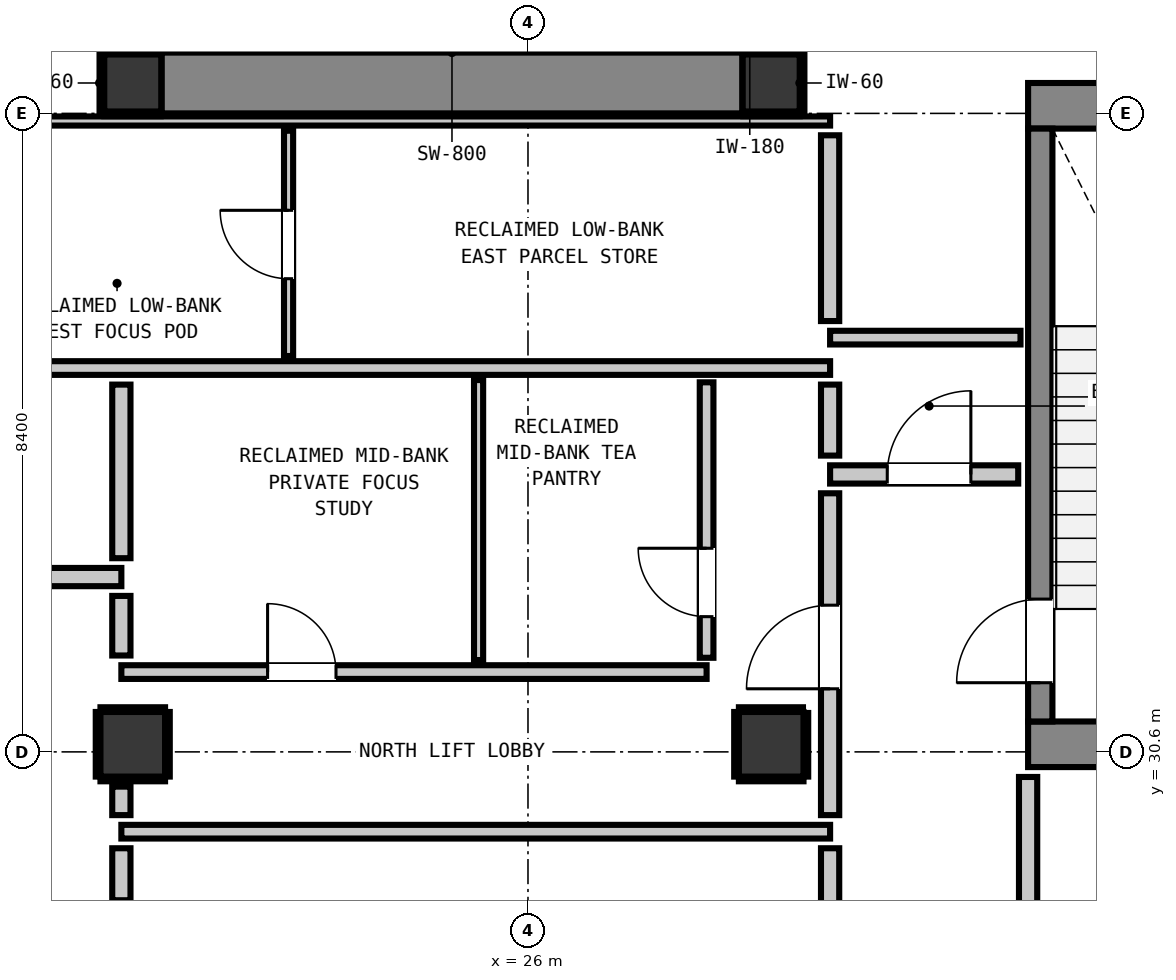
"""IFC4 building model, lengths in metres.
Left out: names, types, materials, properties, quantities, classifications, styles, units other than length and angle.
Written with IfcOpenShell. Run it as: python <this file> out.ifc"""

import sys

from ifc_helpers import new_model, si_unit, direction, frame, frame_2d, origin, origin_2d, place, context, subcontext, project, spatial, rectangle, extrude, element, fill, save


model = new_model("IFC4")
c1 = context("Model", 3, precision=1e-05, world=origin(), true_north=direction((0.0, 1.0)))
c2 = subcontext(c1, "Body", "Model", "MODEL_VIEW")
j1 = project(units=[si_unit("LENGTHUNIT", "METRE"), si_unit("PLANEANGLEUNIT", "RADIAN")], contexts=[c1])
p1 = place(None, origin())
s1 = spatial("IfcSite", under=j1, at=p1, CompositionType="ELEMENT")
p2 = place(p1, origin())
s2 = spatial("IfcBuilding", under=s1, at=p2, CompositionType="ELEMENT")
p3 = place(p2, frame((0.0, 0.0, 273.48)))
s3 = spatial("IfcBuildingStorey", under=s2, at=p3, CompositionType="ELEMENT", Elevation=273.48)
for number, where, z_axis, x_axis in (
    (1, (20.8, 39.4, 0.0), (0.0, 0.0, 1.0), (1.0, 0.0, 0.0)),
    (2, (29.2, 39.4, 0.0), (0.0, 0.0, 1.0), (1.0, 0.0, 0.0)),
):
    element("IfcColumn", number, at=place(p3, frame(where, z_axis=z_axis, x_axis=x_axis)), inside=s3, PredefinedType="COLUMN", context=c2, shape_type="SweptSolid", body=[
        extrude(rectangle(XDim=0.75, YDim=0.75, at=origin_2d()), origin(), (0.0, 0.0, 1.0), 4.18),
    ])
p4 = place(p3, frame((32.58, 39.1, 0.0), z_axis=(0.0, 0.0, 1.0), x_axis=(1.0, 0.0, 0.0)))
e3 = element("IfcWall", 3, at=p4, inside=s3, PredefinedType="SHEAR", context=c2, shape_type="SweptSolid", body=[
    extrude(rectangle(XDim=4.08, YDim=0.6, at=frame_2d((2.04, 0.0))), origin(), (0.0, 0.0, 1.0), 4.6),
])
p5 = place(p3, frame((32.58, 30.7, 0.0), z_axis=(0.0, 0.0, 1.0), x_axis=(1.0, 0.0, 0.0)))
e4 = element("IfcWall", 4, at=p5, inside=s3, PredefinedType="SHEAR", context=c2, shape_type="SweptSolid", body=[
    extrude(rectangle(XDim=3.54, YDim=0.6, at=frame_2d((1.77, 0.0))), origin(), (0.0, 0.0, 1.0), 4.6),
])
p6 = place(p3, frame((21.18, 39.4, 0.0), z_axis=(0.0, 0.0, 1.0), x_axis=(1.0, 0.0, 0.0)))
e5 = element("IfcWall", 5, at=p6, inside=s3, PredefinedType="SHEAR", context=c2, shape_type="SweptSolid", body=[
    extrude(rectangle(XDim=7.64, YDim=0.8, at=frame_2d((3.82, 0.0))), origin(), (0.0, 0.0, 1.0), 4.6),
])
p7 = place(p3, frame((32.74, 31.0, 0.0), z_axis=(0.0, 0.0, 1.0), x_axis=(0.0, 1.0, 0.0)))
e6 = element("IfcWall", 6, at=p7, inside=s3, PredefinedType="SHEAR", context=c2, shape_type="SweptSolid", body=[
    extrude(rectangle(XDim=7.8, YDim=0.32, at=frame_2d((3.9, 0.0))), origin(), (0.0, 0.0, 1.0), 4.6),
])
p8 = place(p7, frame((0.51, 0.0, 0.0)))
e7 = element("IfcOpeningElement", 7, at=p8, cuts=e6, PredefinedType="OPENING", context=c2, shape_type="SweptSolid", body=[
    extrude(rectangle(XDim=1.1, YDim=2.15, at=frame_2d((0.55, 1.075))), frame((0.0, 0.17, 0.0), z_axis=(0.0, -1.0, 0.0), x_axis=(1.0, 0.0, 0.0)), (0.0, 0.0, 1.0), 0.34),
])
for number, where, z_axis, x_axis in (
    (8, (20.8, 30.7, 0.0), (0.0, 0.0, 1.0), (1.0, 0.0, 0.0)),
    (9, (29.2, 30.7, 0.0), (0.0, 0.0, 1.0), (1.0, 0.0, 0.0)),
):
    element("IfcColumn", number, at=place(p3, frame(where, z_axis=z_axis, x_axis=x_axis)), inside=s3, PredefinedType="COLUMN", context=c2, shape_type="SweptSolid", body=[
        extrude(rectangle(XDim=0.85, YDim=0.85, at=origin_2d()), origin(), (0.0, 0.0, 1.0), 4.6),
    ])
p9 = place(p3, frame((17.45, 32.9, 0.0), z_axis=(0.0, 0.0, 1.0), x_axis=(1.0, 0.0, 0.0)))
e10 = element("IfcWall", 10, at=p9, inside=s3, PredefinedType="PARTITIONING", context=c2, shape_type="SweptSolid", body=[
    extrude(rectangle(XDim=3.2, YDim=0.24, at=frame_2d((1.6, 0.0))), origin(), (0.0, 0.0, 1.0), 4.18),
])
p10 = place(p9, frame((0.159, 0.0, 0.0)))
e11 = element("IfcOpeningElement", 11, at=p10, cuts=e10, PredefinedType="OPENING", context=c2, shape_type="SweptSolid", body=[
    extrude(rectangle(XDim=1.1, YDim=2.15, at=frame_2d((0.55, 1.075))), frame((0.0, 0.13, 0.0), z_axis=(0.0, -1.0, 0.0), x_axis=(1.0, 0.0, 0.0)), (0.0, 0.0, 1.0), 0.26),
])
p11 = place(p3, frame((29.975, 34.25, 0.0), z_axis=(0.0, 0.0, 1.0), x_axis=(1.0, 0.0, 0.0)))
e12 = element("IfcWall", 12, at=p11, inside=s3, PredefinedType="PARTITIONING", context=c2, shape_type="SweptSolid", body=[
    extrude(rectangle(XDim=2.475, YDim=0.24, at=frame_2d((1.237, 0.0))), origin(), (0.0, 0.0, 1.0), 4.18),
])
p12 = place(p11, frame((0.752, 0.0, 0.0)))
e13 = element("IfcOpeningElement", 13, at=p12, cuts=e12, PredefinedType="OPENING", context=c2, shape_type="SweptSolid", body=[
    extrude(rectangle(XDim=1.1, YDim=2.15, at=frame_2d((0.55, 1.075))), frame((0.0, 0.13, 0.0), z_axis=(0.0, -1.0, 0.0), x_axis=(1.0, 0.0, 0.0)), (0.0, 0.0, 1.0), 0.26),
])
p13 = place(p3, frame((20.65, 29.55, 0.0), z_axis=(0.0, 0.0, 1.0), x_axis=(1.0, 0.0, 0.0)))
e14 = element("IfcWall", 14, at=p13, inside=s3, PredefinedType="PARTITIONING", context=c2, shape_type="SweptSolid", body=[
    extrude(rectangle(XDim=9.325, YDim=0.18, at=frame_2d((4.663, 0.0))), origin(), (0.0, 0.0, 1.0), 4.18),
])
p14 = place(p3, frame((20.65, 31.65, 0.0), z_axis=(0.0, 0.0, 1.0), x_axis=(1.0, 0.0, 0.0)))
e15 = element("IfcWall", 15, at=p14, inside=s3, PredefinedType="PARTITIONING", context=c2, shape_type="SweptSolid", body=[
    extrude(rectangle(XDim=7.7, YDim=0.18, at=frame_2d((3.85, 0.0))), origin(), (0.0, 0.0, 1.0), 4.18),
])
p15 = place(p14, frame((1.924, 0.0, 0.0)))
e16 = element("IfcOpeningElement", 16, at=p15, cuts=e15, PredefinedType="OPENING", context=c2, shape_type="SweptSolid", body=[
    extrude(rectangle(XDim=0.9, YDim=2.1, at=frame_2d((0.45, 1.05))), frame((0.0, 0.1, 0.0), z_axis=(0.0, -1.0, 0.0), x_axis=(1.0, 0.0, 0.0)), (0.0, 0.0, 1.0), 0.2),
])
p16 = place(p3, frame((18.95, 35.65, 0.0), z_axis=(0.0, 0.0, 1.0), x_axis=(1.0, 0.0, 0.0)))
e17 = element("IfcWall", 17, at=p16, inside=s3, PredefinedType="PARTITIONING", context=c2, shape_type="SweptSolid", body=[
    extrude(rectangle(XDim=11.025, YDim=0.18, at=frame_2d((5.513, 0.0))), origin(), (0.0, 0.0, 1.0), 4.18),
])
p17 = place(p3, frame((29.975, 36.05, 0.0), z_axis=(0.0, 0.0, 1.0), x_axis=(1.0, 0.0, 0.0)))
e18 = element("IfcWall", 18, at=p17, inside=s3, PredefinedType="PARTITIONING", context=c2, shape_type="SweptSolid", body=[
    extrude(rectangle(XDim=2.505, YDim=0.18, at=frame_2d((1.252, 0.0))), origin(), (0.0, 0.0, 1.0), 4.18),
])
p18 = place(p3, frame((18.95, 38.9, 0.0), z_axis=(0.0, 0.0, 1.0), x_axis=(1.0, 0.0, 0.0)))
e19 = element("IfcWall", 19, at=p18, inside=s3, PredefinedType="PARTITIONING", context=c2, shape_type="SweptSolid", body=[
    extrude(rectangle(XDim=11.025, YDim=0.12, at=frame_2d((5.513, 0.0))), origin(), (0.0, 0.0, 1.0), 1.965),
])
p19 = place(p3, frame((20.65, 28.648, 0.0), z_axis=(0.0, 0.0, 1.0), x_axis=(0.0, 1.0, 0.0)))
e20 = element("IfcWall", 20, at=p19, inside=s3, PredefinedType="PARTITIONING", context=c2, shape_type="SweptSolid", body=[
    extrude(rectangle(XDim=0.684, YDim=0.24, at=frame_2d((0.342, 0.0))), origin(), (0.0, 0.0, 1.0), 1.965),
])
p20 = place(p3, frame((20.65, 29.768, 0.0), z_axis=(0.0, 0.0, 1.0), x_axis=(0.0, 1.0, 0.0)))
e21 = element("IfcWall", 21, at=p20, inside=s3, PredefinedType="PARTITIONING", context=c2, shape_type="SweptSolid", body=[
    extrude(rectangle(XDim=0.375, YDim=0.24, at=frame_2d((0.188, 0.0))), origin(), (0.0, 0.0, 1.0), 1.965),
])
p21 = place(p3, frame((20.65, 31.868, 0.0), z_axis=(0.0, 0.0, 1.0), x_axis=(0.0, 1.0, 0.0)))
e22 = element("IfcWall", 22, at=p21, inside=s3, PredefinedType="PARTITIONING", context=c2, shape_type="SweptSolid", body=[
    extrude(rectangle(XDim=0.784, YDim=0.24, at=frame_2d((0.392, 0.0))), origin(), (0.0, 0.0, 1.0), 1.965),
])
p22 = place(p3, frame((20.65, 33.148, 0.0), z_axis=(0.0, 0.0, 1.0), x_axis=(0.0, 1.0, 0.0)))
e23 = element("IfcWall", 23, at=p22, inside=s3, PredefinedType="PARTITIONING", context=c2, shape_type="SweptSolid", body=[
    extrude(rectangle(XDim=2.284, YDim=0.24, at=frame_2d((1.142, 0.0))), origin(), (0.0, 0.0, 1.0), 1.965),
])
p23 = place(p3, frame((29.975, 25.648, 0.0), z_axis=(0.0, 0.0, 1.0), x_axis=(0.0, 1.0, 0.0)))
e24 = element("IfcWall", 24, at=p23, inside=s3, PredefinedType="PARTITIONING", context=c2, shape_type="SweptSolid", body=[
    extrude(rectangle(XDim=3.684, YDim=0.24, at=frame_2d((1.842, 0.0))), origin(), (0.0, 0.0, 1.0), 4.18),
])
p24 = place(p3, frame((29.975, 29.768, 0.0), z_axis=(0.0, 0.0, 1.0), x_axis=(0.0, 1.0, 0.0)))
e25 = element("IfcWall", 25, at=p24, inside=s3, PredefinedType="PARTITIONING", context=c2, shape_type="SweptSolid", body=[
    extrude(rectangle(XDim=4.234, YDim=0.24, at=frame_2d((2.117, 0.0))), origin(), (0.0, 0.0, 1.0), 4.18),
])
p25 = place(p24, frame((1.662, 0.0, 0.0)))
e26 = element("IfcOpeningElement", 26, at=p25, cuts=e25, PredefinedType="OPENING", context=c2, shape_type="SweptSolid", body=[
    extrude(rectangle(XDim=1.1, YDim=2.15, at=frame_2d((0.55, 1.075))), frame((0.0, 0.13, 0.0), z_axis=(0.0, -1.0, 0.0), x_axis=(1.0, 0.0, 0.0)), (0.0, 0.0, 1.0), 0.26),
])
p26 = place(p3, frame((29.975, 34.498, 0.0), z_axis=(0.0, 0.0, 1.0), x_axis=(0.0, 1.0, 0.0)))
e27 = element("IfcWall", 27, at=p26, inside=s3, PredefinedType="PARTITIONING", context=c2, shape_type="SweptSolid", body=[
    extrude(rectangle(XDim=0.934, YDim=0.24, at=frame_2d((0.467, 0.0))), origin(), (0.0, 0.0, 1.0), 4.18),
])
p27 = place(p3, frame((29.975, 36.268, 0.0), z_axis=(0.0, 0.0, 1.0), x_axis=(0.0, 1.0, 0.0)))
e28 = element("IfcWall", 28, at=p27, inside=s3, PredefinedType="PARTITIONING", context=c2, shape_type="SweptSolid", body=[
    extrude(rectangle(XDim=2.444, YDim=0.24, at=frame_2d((1.222, 0.0))), origin(), (0.0, 0.0, 1.0), 4.18),
])
p28 = place(p3, frame((32.58, 25.648, 0.0), z_axis=(0.0, 0.0, 1.0), x_axis=(0.0, 1.0, 0.0)))
e29 = element("IfcWall", 29, at=p28, inside=s3, PredefinedType="PARTITIONING", context=c2, shape_type="SweptSolid", body=[
    extrude(rectangle(XDim=4.622, YDim=0.24, at=frame_2d((2.311, 0.0))), origin(), (0.0, 0.0, 1.0), 4.18),
])
p29 = place(p3, frame((28.35, 31.838, 0.0), z_axis=(0.0, 0.0, 1.0), x_axis=(0.0, 1.0, 0.0)))
e30 = element("IfcWall", 30, at=p29, inside=s3, PredefinedType="PARTITIONING", context=c2, shape_type="SweptSolid", body=[
    extrude(rectangle(XDim=3.624, YDim=0.18, at=frame_2d((1.812, 0.0))), origin(), (0.0, 0.0, 1.0), 4.18),
])
p30 = place(p29, frame((0.541, 0.0, 0.0)))
e31 = element("IfcOpeningElement", 31, at=p30, cuts=e30, PredefinedType="OPENING", context=c2, shape_type="SweptSolid", body=[
    extrude(rectangle(XDim=0.9, YDim=2.1, at=frame_2d((0.45, 1.05))), frame((0.0, 0.1, 0.0), z_axis=(0.0, -1.0, 0.0), x_axis=(1.0, 0.0, 0.0)), (0.0, 0.0, 1.0), 0.2),
])
p31 = place(p3, frame((22.85, 35.808, 0.0), z_axis=(0.0, 0.0, 1.0), x_axis=(0.0, 1.0, 0.0)))
e32 = element("IfcWall", 32, at=p31, inside=s3, PredefinedType="PARTITIONING", context=c2, shape_type="SweptSolid", body=[
    extrude(rectangle(XDim=2.964, YDim=0.12, at=frame_2d((1.482, 0.0))), origin(), (0.0, 0.0, 1.0), 4.18),
])
p32 = place(p31, frame((1.017, 0.0, 0.0)))
e33 = element("IfcOpeningElement", 33, at=p32, cuts=e32, PredefinedType="OPENING", context=c2, shape_type="SweptSolid", body=[
    extrude(rectangle(XDim=0.9, YDim=2.1, at=frame_2d((0.45, 1.05))), frame((0.0, 0.07, 0.0), z_axis=(0.0, -1.0, 0.0), x_axis=(1.0, 0.0, 0.0)), (0.0, 0.0, 1.0), 0.14),
])
p33 = place(p3, frame((25.35, 31.808, 0.0), z_axis=(0.0, 0.0, 1.0), x_axis=(0.0, 1.0, 0.0)))
e34 = element("IfcWall", 34, at=p33, inside=s3, PredefinedType="PARTITIONING", context=c2, shape_type="SweptSolid", body=[
    extrude(rectangle(XDim=3.684, YDim=0.12, at=frame_2d((1.842, 0.0))), origin(), (0.0, 0.0, 1.0), 4.18),
])
for number, where, z_axis, x_axis in (
    (35, (20.425, 38.993, 0.0), (0.0, 0.0, 1.0), (1.0, 0.0, 0.0)),
    (36, (20.425, 39.807, 0.0), (0.0, 0.0, 1.0), (1.0, 0.0, 0.0)),
):
    element("IfcWall", number, at=place(p3, frame(where, z_axis=z_axis, x_axis=x_axis)), inside=s3, PredefinedType="PARTITIONING", context=c2, shape_type="SweptSolid", body=[
        extrude(rectangle(XDim=0.742, YDim=0.06, at=frame_2d((0.371, 0.0))), origin(), (0.0, 0.0, 1.0), 1.45),
    ])
p34 = place(p3, frame((20.393, 39.025, 0.0), z_axis=(0.0, 0.0, 1.0), x_axis=(0.0, 1.0, 0.0)))
e37 = element("IfcWall", 37, at=p34, inside=s3, PredefinedType="PARTITIONING", context=c2, shape_type="SweptSolid", body=[
    extrude(rectangle(XDim=0.75, YDim=0.06, at=frame_2d((0.375, 0.0))), origin(), (0.0, 0.0, 1.0), 1.45),
])
for number, where, z_axis, x_axis in (
    (38, (28.833, 38.993, 0.0), (0.0, 0.0, 1.0), (1.0, 0.0, 0.0)),
    (39, (28.833, 39.807, 0.0), (0.0, 0.0, 1.0), (1.0, 0.0, 0.0)),
):
    element("IfcWall", number, at=place(p3, frame(where, z_axis=z_axis, x_axis=x_axis)), inside=s3, PredefinedType="PARTITIONING", context=c2, shape_type="SweptSolid", body=[
        extrude(rectangle(XDim=0.742, YDim=0.06, at=frame_2d((0.371, 0.0))), origin(), (0.0, 0.0, 1.0), 1.45),
    ])
p35 = place(p3, frame((29.607, 39.025, 0.0), z_axis=(0.0, 0.0, 1.0), x_axis=(0.0, 1.0, 0.0)))
e40 = element("IfcWall", 40, at=p35, inside=s3, PredefinedType="PARTITIONING", context=c2, shape_type="SweptSolid", body=[
    extrude(rectangle(XDim=0.75, YDim=0.06, at=frame_2d((0.375, 0.0))), origin(), (0.0, 0.0, 1.0), 1.45),
])
for number, where, z_axis, x_axis in (
    (41, (20.375, 30.243, 0.0), (0.0, 0.0, 1.0), (1.0, 0.0, 0.0)),
    (42, (20.375, 31.157, 0.0), (0.0, 0.0, 1.0), (1.0, 0.0, 0.0)),
    (43, (20.343, 30.275, 0.0), (0.0, 0.0, 1.0), (0.0, 1.0, 0.0)),
    (44, (21.257, 30.275, 0.0), (0.0, 0.0, 1.0), (0.0, 1.0, 0.0)),
    (45, (28.775, 30.243, 0.0), (0.0, 0.0, 1.0), (1.0, 0.0, 0.0)),
):
    element("IfcWall", number, at=place(p3, frame(where, z_axis=z_axis, x_axis=x_axis)), inside=s3, PredefinedType="PARTITIONING", context=c2, shape_type="SweptSolid", body=[
        extrude(rectangle(XDim=0.85, YDim=0.06, at=frame_2d((0.425, 0.0))), origin(), (0.0, 0.0, 1.0), 1.45),
    ])
p36 = place(p3, frame((28.775, 31.157, 0.0), z_axis=(0.0, 0.0, 1.0), x_axis=(1.0, 0.0, 0.0)))
e46 = element("IfcWall", 46, at=p36, inside=s3, PredefinedType="PARTITIONING", context=c2, shape_type="SweptSolid", body=[
    extrude(rectangle(XDim=0.843, YDim=0.06, at=frame_2d((0.421, 0.0))), origin(), (0.0, 0.0, 1.0), 1.45),
])
p37 = place(p3, frame((28.743, 30.275, 0.0), z_axis=(0.0, 0.0, 1.0), x_axis=(0.0, 1.0, 0.0)))
e47 = element("IfcWall", 47, at=p37, inside=s3, PredefinedType="PARTITIONING", context=c2, shape_type="SweptSolid", body=[
    extrude(rectangle(XDim=0.85, YDim=0.06, at=frame_2d((0.425, 0.0))), origin(), (0.0, 0.0, 1.0), 1.45),
])
p38 = place(p3, frame((29.657, 30.275, 0.0), z_axis=(0.0, 0.0, 1.0), x_axis=(0.0, 1.0, 0.0)))
e48 = element("IfcWall", 48, at=p38, inside=s3, PredefinedType="PARTITIONING", context=c2, shape_type="SweptSolid", body=[
    extrude(rectangle(XDim=0.837, YDim=0.06, at=frame_2d((0.418, 0.0))), origin(), (0.0, 0.0, 1.0), 1.45),
])
p39 = place(p8, origin())
e49 = element("IfcDoor", 49, at=p39, inside=s3, OperationType="SINGLE_SWING_LEFT", PredefinedType="DOOR", context=c2, shape_type="SweptSolid", body=[
    extrude(rectangle(XDim=1.1, YDim=2.15, at=frame_2d((0.55, 1.075))), frame((0.0, 0.025, 0.0), z_axis=(0.0, -1.0, 0.0), x_axis=(1.0, 0.0, 0.0)), (0.0, 0.0, 1.0), 0.05),
])
fill(e7, e49)
p40 = place(p25, origin())
e50 = element("IfcDoor", 50, at=p40, inside=s3, OperationType="SINGLE_SWING_LEFT", PredefinedType="DOOR", context=c2, shape_type="SweptSolid", body=[
    extrude(rectangle(XDim=1.1, YDim=2.15, at=frame_2d((0.55, 1.075))), frame((0.0, 0.025, 0.0), z_axis=(0.0, -1.0, 0.0), x_axis=(1.0, 0.0, 0.0)), (0.0, 0.0, 1.0), 0.05),
])
fill(e26, e50)
p41 = place(p12, origin())
e51 = element("IfcDoor", 51, at=p41, inside=s3, OperationType="SINGLE_SWING_RIGHT", PredefinedType="DOOR", context=c2, shape_type="SweptSolid", body=[
    extrude(rectangle(XDim=1.1, YDim=2.15, at=frame_2d((0.55, 1.075))), frame((0.0, 0.025, 0.0), z_axis=(0.0, -1.0, 0.0), x_axis=(1.0, 0.0, 0.0)), (0.0, 0.0, 1.0), 0.05),
])
fill(e13, e51)
p42 = place(p32, origin())
e52 = element("IfcDoor", 52, at=p42, inside=s3, OperationType="SINGLE_SWING_RIGHT", PredefinedType="DOOR", context=c2, shape_type="SweptSolid", body=[
    extrude(rectangle(XDim=0.9, YDim=2.1, at=frame_2d((0.45, 1.05))), frame((0.0, 0.025, 0.0), z_axis=(0.0, -1.0, 0.0), x_axis=(1.0, 0.0, 0.0)), (0.0, 0.0, 1.0), 0.05),
])
fill(e33, e52)
p43 = place(p15, origin())
e53 = element("IfcDoor", 53, at=p43, inside=s3, OperationType="SINGLE_SWING_LEFT", PredefinedType="DOOR", context=c2, shape_type="SweptSolid", body=[
    extrude(rectangle(XDim=0.9, YDim=2.1, at=frame_2d((0.45, 1.05))), frame((0.0, 0.025, 0.0), z_axis=(0.0, -1.0, 0.0), x_axis=(1.0, 0.0, 0.0)), (0.0, 0.0, 1.0), 0.05),
])
fill(e16, e53)
p44 = place(p30, origin())
e54 = element("IfcDoor", 54, at=p44, inside=s3, OperationType="SINGLE_SWING_RIGHT", PredefinedType="DOOR", context=c2, shape_type="SweptSolid", body=[
    extrude(rectangle(XDim=0.9, YDim=2.1, at=frame_2d((0.45, 1.05))), frame((0.0, 0.025, 0.0), z_axis=(0.0, -1.0, 0.0), x_axis=(1.0, 0.0, 0.0)), (0.0, 0.0, 1.0), 0.05),
])
fill(e31, e54)
save(model, sys.argv[1])
